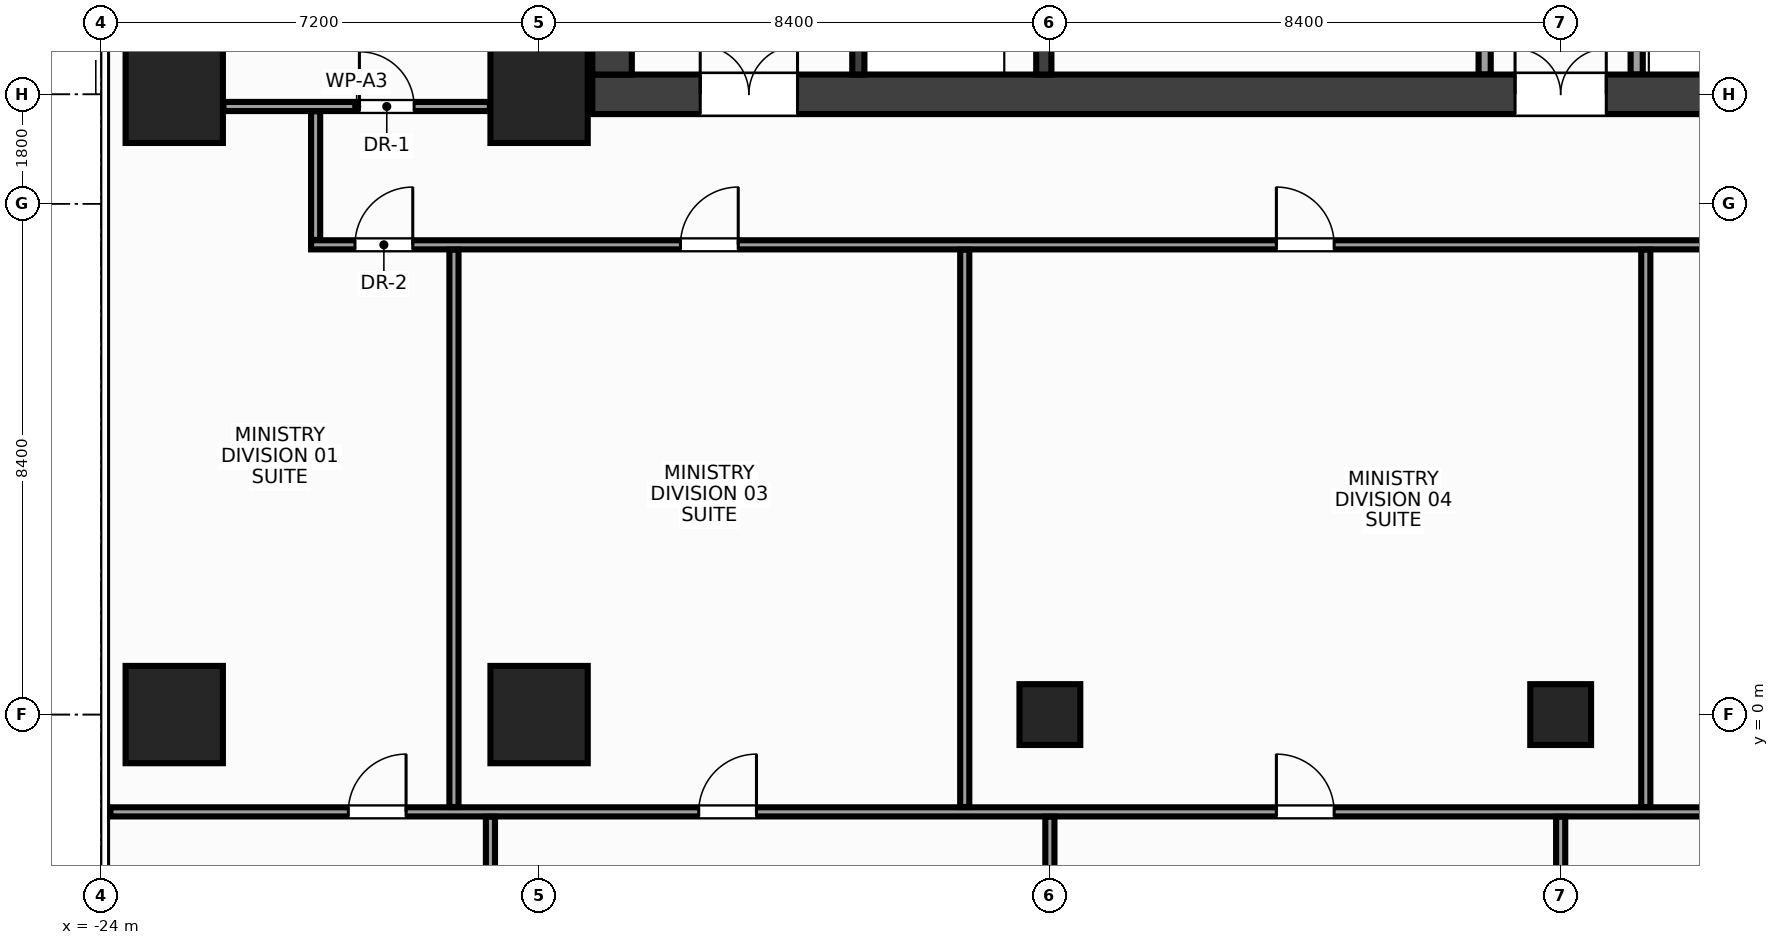
"""IFC4 building model, lengths in metres.
Left out: names, types, materials, properties, quantities, classifications, styles, units other than length and angle.
Written with IfcOpenShell. Run it as: python <this file> out.ifc"""

import sys

from ifc_helpers import new_model, si_unit, direction, frame, frame_2d, origin, origin_with_axes, origin_2d, place, context, subcontext, project, spatial, rectangle, hollow_rectangle, extrude, source, transform, mapped, element, fill, save


model = new_model("IFC4")
c1 = context("Model", 3, precision=1e-05, world=origin(), true_north=direction((0.0, 1.0)))
c2 = subcontext(c1, "Body", "Model", "MODEL_VIEW")
j1 = project(units=[si_unit("LENGTHUNIT", "METRE"), si_unit("PLANEANGLEUNIT", "RADIAN")], contexts=[c1])
p1 = place(None, origin())
s1 = spatial("IfcSite", under=j1, at=p1, CompositionType="ELEMENT")
p2 = place(p1, origin())
s2 = spatial("IfcBuilding", under=s1, at=p2, CompositionType="ELEMENT")
p3 = place(p2, frame((0.0, 0.0, 153.2)))
s3 = spatial("IfcBuildingStorey", under=s2, at=p3, CompositionType="ELEMENT", Elevation=153.2)
m1 = source(origin(), c2, "Body", "SweptSolid", [
    extrude(rectangle(XDim=31.85, YDim=0.65, at=frame_2d((15.925, 0.0))), origin(), (0.0, 0.0, 1.0), 3.6),
])
p4 = place(p3, frame((-15.925, 10.2, 0.0), z_axis=(0.0, 0.0, 1.0), x_axis=(1.0, 0.0, 0.0)))
e1 = element("IfcWall", 1, at=p4, inside=s3, PredefinedType="SHEAR", context=c2, shape_type="MappedRepresentation", body=[
    mapped(m1, transform((0.0, 0.0, 0.0), x_axis=(1.0, 0.0, 0.0), y_axis=(0.0, 1.0, 0.0), z_axis=(0.0, 0.0, 1.0), scale=1.0)),
])
p5 = place(p4, frame((1.775, 0.0, 0.0)))
e2 = element("IfcOpeningElement", 2, at=p5, cuts=e1, PredefinedType="OPENING", context=c2, shape_type="SweptSolid", body=[
    extrude(rectangle(XDim=1.6, YDim=2.15, at=frame_2d((0.8, 1.075))), frame((0.0, 0.337, 0.0), z_axis=(0.0, -1.0, 0.0), x_axis=(1.0, 0.0, 0.0)), (0.0, 0.0, 1.0), 0.674),
])
p6 = place(p4, frame((28.475, 0.0, 0.0)))
e3 = element("IfcOpeningElement", 3, at=p6, cuts=e1, PredefinedType="OPENING", context=c2, shape_type="SweptSolid", body=[
    extrude(rectangle(XDim=1.6, YDim=2.15, at=frame_2d((0.8, 1.075))), frame((0.0, 0.337, 0.0), z_axis=(0.0, -1.0, 0.0), x_axis=(1.0, 0.0, 0.0)), (0.0, 0.0, 1.0), 0.674),
])
p7 = place(p4, frame((15.175, 0.0, 0.0)))
e4 = element("IfcOpeningElement", 4, at=p7, cuts=e1, PredefinedType="OPENING", context=c2, shape_type="SweptSolid", body=[
    extrude(rectangle(XDim=1.5, YDim=2.2, at=frame_2d((0.75, 1.1))), frame((0.0, 0.337, 0.0), z_axis=(0.0, -1.0, 0.0), x_axis=(1.0, 0.0, 0.0)), (0.0, 0.0, 1.0), 0.674),
])
m2 = source(origin(), c2, "Body", "SweptSolid", [
    extrude(rectangle(XDim=12.95, YDim=0.65, at=frame_2d((6.475, 0.0))), origin(), (0.0, 0.0, 1.0), 3.6),
])
p8 = place(p3, frame((-15.6, 10.525, 0.0), z_axis=(0.0, 0.0, 1.0), x_axis=(0.0, 1.0, 0.0)))
e5 = element("IfcWall", 5, at=p8, inside=s3, PredefinedType="SHEAR", context=c2, shape_type="MappedRepresentation", body=[
    mapped(m2, transform((0.0, 0.0, 0.0), x_axis=(1.0, 0.0, 0.0), y_axis=(0.0, 1.0, 0.0), z_axis=(0.0, 0.0, 1.0), scale=1.0)),
])
m3 = source(origin(), c2, "Body", "SweptSolid", [
    extrude(rectangle(XDim=12.95, YDim=0.25, at=frame_2d((6.475, 0.0))), origin(), (0.0, 0.0, 1.0), 3.6),
])
p9 = place(p3, frame((-8.5, 10.525, 0.0), z_axis=(0.0, 0.0, 1.0), x_axis=(0.0, 1.0, 0.0)))
e6 = element("IfcWall", 6, at=p9, inside=s3, PredefinedType="SHEAR", context=c2, shape_type="MappedRepresentation", body=[
    mapped(m3, transform((0.0, 0.0, 0.0), x_axis=(1.0, 0.0, 0.0), y_axis=(0.0, 1.0, 0.0), z_axis=(0.0, 0.0, 1.0), scale=1.0)),
])
p10 = place(p9, frame((4.145, 0.0, 0.0)))
e7 = element("IfcOpeningElement", 7, at=p10, cuts=e6, PredefinedType="OPENING", context=c2, shape_type="SweptSolid", body=[
    extrude(rectangle(XDim=1.1, YDim=2.15, at=frame_2d((0.55, 1.075))), frame((0.0, 0.137, 0.0), z_axis=(0.0, -1.0, 0.0), x_axis=(1.0, 0.0, 0.0)), (0.0, 0.0, 1.0), 0.274),
])
p11 = place(p9, frame((6.065, 0.0, 0.0)))
e8 = element("IfcOpeningElement", 8, at=p11, cuts=e6, PredefinedType="OPENING", context=c2, shape_type="SweptSolid", body=[
    extrude(rectangle(XDim=1.1, YDim=2.15, at=frame_2d((0.55, 1.075))), frame((0.0, 0.137, 0.0), z_axis=(0.0, -1.0, 0.0), x_axis=(1.0, 0.0, 0.0)), (0.0, 0.0, 1.0), 0.274),
])
p12 = place(p9, frame((7.985, 0.0, 0.0)))
e9 = element("IfcOpeningElement", 9, at=p12, cuts=e6, PredefinedType="OPENING", context=c2, shape_type="SweptSolid", body=[
    extrude(rectangle(XDim=1.1, YDim=2.15, at=frame_2d((0.55, 1.075))), frame((0.0, 0.137, 0.0), z_axis=(0.0, -1.0, 0.0), x_axis=(1.0, 0.0, 0.0)), (0.0, 0.0, 1.0), 0.274),
])
m4 = source(origin(), c2, "Body", "SweptSolid", [
    extrude(rectangle(XDim=3.125, YDim=0.2, at=frame_2d((1.562, 0.0))), origin(), (0.0, 0.0, 1.0), 3.6),
])
p13 = place(p3, frame((-11.55, 10.525, 0.0), z_axis=(0.0, 0.0, 1.0), x_axis=(0.0, 1.0, 0.0)))
e10 = element("IfcWall", 10, at=p13, inside=s3, PredefinedType="SHEAR", context=c2, shape_type="MappedRepresentation", body=[
    mapped(m4, transform((0.0, 0.0, 0.0), x_axis=(1.0, 0.0, 0.0), y_axis=(0.0, 1.0, 0.0), z_axis=(0.0, 0.0, 1.0), scale=1.0)),
])
p14 = place(p13, frame((0.9, 0.0, 0.0)))
e11 = element("IfcOpeningElement", 11, at=p14, cuts=e10, PredefinedType="OPENING", context=c2, shape_type="SweptSolid", body=[
    extrude(rectangle(XDim=1.1, YDim=2.15, at=frame_2d((0.55, 1.075))), frame((0.0, 0.112, 0.0), z_axis=(0.0, -1.0, 0.0), x_axis=(1.0, 0.0, 0.0)), (0.0, 0.0, 1.0), 0.224),
])
m5 = source(origin(), c2, "Body", "SweptSolid", [
    extrude(rectangle(XDim=1.6, YDim=1.6, at=origin_2d()), origin(), (0.0, 0.0, 1.0), 3.6),
])
for number, where, z_axis, x_axis in (
    (12, (-16.8, 0.0, 0.0), (0.0, 0.0, 1.0), (1.0, 0.0, 0.0)),
    (13, (-16.8, 10.2, 0.0), (0.0, 0.0, 1.0), (1.0, 0.0, 0.0)),
    (14, (-22.8, 0.0, 0.0), (0.0, 0.0, 1.0), (1.0, 0.0, 0.0)),
    (15, (-22.8, 10.2, 0.0), (0.0, 0.0, 1.0), (1.0, 0.0, 0.0)),
):
    element("IfcColumn", number, at=place(p3, frame(where, z_axis=z_axis, x_axis=x_axis)), inside=s3, PredefinedType="COLUMN", context=c2, shape_type="MappedRepresentation", body=[
        mapped(m5, transform((0.0, 0.0, 0.0), x_axis=(1.0, 0.0, 0.0), y_axis=(0.0, 1.0, 0.0), z_axis=(0.0, 0.0, 1.0), scale=1.0)),
    ])
m6 = source(origin(), c2, "Body", "SweptSolid", [
    extrude(hollow_rectangle(XDim=1.0, YDim=1.0, WallThickness=0.045, at=origin_2d()), origin(), (0.0, 0.0, 1.0), 3.6),
])
p15 = place(p3, frame((-8.4, 0.0, 0.0), z_axis=(0.0, 0.0, 1.0), x_axis=(1.0, 0.0, 0.0)))
e16 = element("IfcColumn", 16, at=p15, inside=s3, PredefinedType="COLUMN", context=c2, shape_type="MappedRepresentation", body=[
    mapped(m6, transform((0.0, 0.0, 0.0), x_axis=(1.0, 0.0, 0.0), y_axis=(0.0, 1.0, 0.0), z_axis=(0.0, 0.0, 1.0), scale=1.0)),
])
m7 = source(origin(), c2, "Body", "SweptSolid", [
    extrude(rectangle(XDim=1.0, YDim=1.0, at=origin_2d()), origin(), (0.0, 0.0, 1.0), 3.6),
])
p16 = place(p3, origin_with_axes())
e17 = element("IfcColumn", 17, at=p16, inside=s3, PredefinedType="COLUMN", context=c2, shape_type="MappedRepresentation", body=[
    mapped(m7, transform((0.0, 0.0, 0.0), x_axis=(1.0, 0.0, 0.0), y_axis=(0.0, 1.0, 0.0), z_axis=(0.0, 0.0, 1.0), scale=1.0)),
])
m8 = source(origin(), c2, "Body", "SweptSolid", [
    extrude(rectangle(XDim=3.415, YDim=0.2, at=frame_2d((1.708, 0.0))), origin(), (0.0, 0.0, 1.0), 3.38),
])
for number, where, z_axis, x_axis in (
    (18, (-1.25, 10.525, 0.0), (0.0, 0.0, 1.0), (0.0, 1.0, 0.0)),
    (19, (1.25, 10.525, 0.0), (0.0, 0.0, 1.0), (0.0, 1.0, 0.0)),
):
    element("IfcWall", number, at=place(p3, frame(where, z_axis=z_axis, x_axis=x_axis)), inside=s3, PredefinedType="PARTITIONING", context=c2, shape_type="MappedRepresentation", body=[
        mapped(m8, transform((0.0, 0.0, 0.0), x_axis=(1.0, 0.0, 0.0), y_axis=(0.0, 1.0, 0.0), z_axis=(0.0, 0.0, 1.0), scale=1.0)),
    ])
m9 = source(origin(), c2, "Body", "SweptSolid", [
    extrude(rectangle(XDim=4.38, YDim=0.15, at=frame_2d((2.19, 0.0))), origin(), (0.0, 0.0, 1.0), 2.915),
])
p17 = place(p3, frame((-21.99, 10.0, 0.0), z_axis=(0.0, 0.0, 1.0), x_axis=(1.0, 0.0, 0.0)))
e20 = element("IfcWall", 20, at=p17, inside=s3, PredefinedType="PARTITIONING", context=c2, shape_type="MappedRepresentation", body=[
    mapped(m9, transform((0.0, 0.0, 0.0), x_axis=(1.0, 0.0, 0.0), y_axis=(0.0, 1.0, 0.0), z_axis=(0.0, 0.0, 1.0), scale=1.0)),
])
p18 = place(p17, frame((2.235, 0.0, 0.0)))
e21 = element("IfcOpeningElement", 21, at=p18, cuts=e20, PredefinedType="OPENING", context=c2, shape_type="SweptSolid", body=[
    extrude(rectangle(XDim=0.9, YDim=2.15, at=frame_2d((0.45, 1.075))), frame((0.0, 0.087, 0.0), z_axis=(0.0, -1.0, 0.0), x_axis=(1.0, 0.0, 0.0)), (0.0, 0.0, 1.0), 0.174),
])
m10 = source(origin(), c2, "Body", "SweptSolid", [
    extrude(rectangle(XDim=31.6, YDim=0.15, at=frame_2d((15.8, 0.0))), origin(), (0.0, 0.0, 1.0), 2.765),
])
p19 = place(p3, frame((-20.55, 7.725, 0.0), z_axis=(0.0, 0.0, 1.0), x_axis=(1.0, 0.0, 0.0)))
e22 = element("IfcWall", 22, at=p19, inside=s3, PredefinedType="PARTITIONING", context=c2, shape_type="MappedRepresentation", body=[
    mapped(m10, transform((0.0, 0.0, 0.0), x_axis=(1.0, 0.0, 0.0), y_axis=(0.0, 1.0, 0.0), z_axis=(0.0, 0.0, 1.0), scale=1.0)),
])
p20 = place(p19, frame((0.722, 0.0, 0.0)))
e23 = element("IfcOpeningElement", 23, at=p20, cuts=e22, PredefinedType="OPENING", context=c2, shape_type="SweptSolid", body=[
    extrude(rectangle(XDim=0.95, YDim=2.15, at=frame_2d((0.475, 1.075))), frame((0.0, 0.087, 0.0), z_axis=(0.0, -1.0, 0.0), x_axis=(1.0, 0.0, 0.0)), (0.0, 0.0, 1.0), 0.174),
])
p21 = place(p19, frame((6.075, 0.0, 0.0)))
e24 = element("IfcOpeningElement", 24, at=p21, cuts=e22, PredefinedType="OPENING", context=c2, shape_type="SweptSolid", body=[
    extrude(rectangle(XDim=0.95, YDim=2.15, at=frame_2d((0.475, 1.075))), frame((0.0, 0.087, 0.0), z_axis=(0.0, -1.0, 0.0), x_axis=(1.0, 0.0, 0.0)), (0.0, 0.0, 1.0), 0.174),
])
p22 = place(p19, frame((15.875, 0.0, 0.0)))
e25 = element("IfcOpeningElement", 25, at=p22, cuts=e22, PredefinedType="OPENING", context=c2, shape_type="SweptSolid", body=[
    extrude(rectangle(XDim=0.95, YDim=2.15, at=frame_2d((0.475, 1.075))), frame((0.0, 0.087, 0.0), z_axis=(0.0, -1.0, 0.0), x_axis=(1.0, 0.0, 0.0)), (0.0, 0.0, 1.0), 0.174),
])
p23 = place(p19, frame((26.278, 0.0, 0.0)))
e26 = element("IfcOpeningElement", 26, at=p23, cuts=e22, PredefinedType="OPENING", context=c2, shape_type="SweptSolid", body=[
    extrude(rectangle(XDim=0.95, YDim=2.15, at=frame_2d((0.475, 1.075))), frame((0.0, 0.087, 0.0), z_axis=(0.0, -1.0, 0.0), x_axis=(1.0, 0.0, 0.0)), (0.0, 0.0, 1.0), 0.174),
])
m11 = source(origin(), c2, "Body", "SweptSolid", [
    extrude(rectangle(XDim=2.115, YDim=0.15, at=frame_2d((1.058, 0.0))), origin(), (0.0, 0.0, 1.0), 3.38),
])
p24 = place(p3, frame((-20.475, 7.805, 0.0), z_axis=(0.0, 0.0, 1.0), x_axis=(0.0, 1.0, 0.0)))
e27 = element("IfcWall", 27, at=p24, inside=s3, PredefinedType="PARTITIONING", context=c2, shape_type="MappedRepresentation", body=[
    mapped(m11, transform((0.0, 0.0, 0.0), x_axis=(1.0, 0.0, 0.0), y_axis=(0.0, 1.0, 0.0), z_axis=(0.0, 0.0, 1.0), scale=1.0)),
])
m12 = source(origin(), c2, "Body", "SweptSolid", [
    extrude(rectangle(XDim=34.895, YDim=0.15, at=frame_2d((17.448, 0.0))), origin(), (0.0, 0.0, 1.0), 2.765),
])
p25 = place(p3, frame((-23.85, -1.6, 0.0), z_axis=(0.0, 0.0, 1.0), x_axis=(1.0, 0.0, 0.0)))
e28 = element("IfcWall", 28, at=p25, inside=s3, PredefinedType="PARTITIONING", context=c2, shape_type="MappedRepresentation", body=[
    mapped(m12, transform((0.0, 0.0, 0.0), x_axis=(1.0, 0.0, 0.0), y_axis=(0.0, 1.0, 0.0), z_axis=(0.0, 0.0, 1.0), scale=1.0)),
])
p26 = place(p25, frame((3.913, 0.0, 0.0)))
e29 = element("IfcOpeningElement", 29, at=p26, cuts=e28, PredefinedType="OPENING", context=c2, shape_type="SweptSolid", body=[
    extrude(rectangle(XDim=0.95, YDim=2.15, at=frame_2d((0.475, 1.075))), frame((0.0, 0.087, 0.0), z_axis=(0.0, -1.0, 0.0), x_axis=(1.0, 0.0, 0.0)), (0.0, 0.0, 1.0), 0.174),
])
p27 = place(p25, frame((9.675, 0.0, 0.0)))
e30 = element("IfcOpeningElement", 30, at=p27, cuts=e28, PredefinedType="OPENING", context=c2, shape_type="SweptSolid", body=[
    extrude(rectangle(XDim=0.95, YDim=2.15, at=frame_2d((0.475, 1.075))), frame((0.0, 0.087, 0.0), z_axis=(0.0, -1.0, 0.0), x_axis=(1.0, 0.0, 0.0)), (0.0, 0.0, 1.0), 0.174),
])
p28 = place(p25, frame((19.175, 0.0, 0.0)))
e31 = element("IfcOpeningElement", 31, at=p28, cuts=e28, PredefinedType="OPENING", context=c2, shape_type="SweptSolid", body=[
    extrude(rectangle(XDim=0.95, YDim=2.15, at=frame_2d((0.475, 1.075))), frame((0.0, 0.087, 0.0), z_axis=(0.0, -1.0, 0.0), x_axis=(1.0, 0.0, 0.0)), (0.0, 0.0, 1.0), 0.174),
])
p29 = place(p25, frame((28.275, 0.0, 0.0)))
e32 = element("IfcOpeningElement", 32, at=p29, cuts=e28, PredefinedType="OPENING", context=c2, shape_type="SweptSolid", body=[
    extrude(rectangle(XDim=0.95, YDim=2.15, at=frame_2d((0.475, 1.075))), frame((0.0, 0.087, 0.0), z_axis=(0.0, -1.0, 0.0), x_axis=(1.0, 0.0, 0.0)), (0.0, 0.0, 1.0), 0.174),
])
m13 = source(origin(), c2, "Body", "SweptSolid", [
    extrude(rectangle(XDim=9.165, YDim=0.15, at=frame_2d((4.583, 0.0))), origin(), (0.0, 0.0, 1.0), 2.915),
])
p30 = place(p3, frame((-18.2, -1.52, 0.0), z_axis=(0.0, 0.0, 1.0), x_axis=(0.0, 1.0, 0.0)))
e33 = element("IfcWall", 33, at=p30, inside=s3, PredefinedType="PARTITIONING", context=c2, shape_type="MappedRepresentation", body=[
    mapped(m13, transform((0.0, 0.0, 0.0), x_axis=(1.0, 0.0, 0.0), y_axis=(0.0, 1.0, 0.0), z_axis=(0.0, 0.0, 1.0), scale=1.0)),
])
m14 = source(origin(), c2, "Body", "SweptSolid", [
    extrude(rectangle(XDim=9.165, YDim=0.15, at=frame_2d((4.583, 0.0))), origin(), (0.0, 0.0, 1.0), 2.665),
])
for number, where, z_axis, x_axis in (
    (34, (-9.8, -1.52, 0.0), (0.0, 0.0, 1.0), (0.0, 1.0, 0.0)),
    (35, (1.4, -1.52, 0.0), (0.0, 0.0, 1.0), (0.0, 1.0, 0.0)),
):
    element("IfcWall", number, at=place(p3, frame(where, z_axis=z_axis, x_axis=x_axis)), inside=s3, PredefinedType="PARTITIONING", context=c2, shape_type="MappedRepresentation", body=[
        mapped(m14, transform((0.0, 0.0, 0.0), x_axis=(1.0, 0.0, 0.0), y_axis=(0.0, 1.0, 0.0), z_axis=(0.0, 0.0, 1.0), scale=1.0)),
    ])
m15 = source(origin(), c2, "Body", "SweptSolid", [
    extrude(rectangle(XDim=8.31, YDim=0.15, at=frame_2d((4.155, 0.0))), origin(), (0.0, 0.0, 1.0), 3.38),
])
p31 = place(p3, frame((-17.6, -9.99, 0.0), z_axis=(0.0, 0.0, 1.0), x_axis=(0.0, 1.0, 0.0)))
e36 = element("IfcWall", 36, at=p31, inside=s3, PredefinedType="PARTITIONING", context=c2, shape_type="MappedRepresentation", body=[
    mapped(m15, transform((0.0, 0.0, 0.0), x_axis=(1.0, 0.0, 0.0), y_axis=(0.0, 1.0, 0.0), z_axis=(0.0, 0.0, 1.0), scale=1.0)),
])
m16 = source(origin(), c2, "Body", "SweptSolid", [
    extrude(rectangle(XDim=8.61, YDim=0.15, at=frame_2d((4.305, 0.0))), origin(), (0.0, 0.0, 1.0), 2.765),
])
for number, where, z_axis, x_axis in (
    (37, (-8.4, -10.29, 0.0), (0.0, 0.0, 1.0), (0.0, 1.0, 0.0)),
    (38, (0.0, -10.29, 0.0), (0.0, 0.0, 1.0), (0.0, 1.0, 0.0)),
):
    element("IfcWall", number, at=place(p3, frame(where, z_axis=z_axis, x_axis=x_axis)), inside=s3, PredefinedType="PARTITIONING", context=c2, shape_type="MappedRepresentation", body=[
        mapped(m16, transform((0.0, 0.0, 0.0), x_axis=(1.0, 0.0, 0.0), y_axis=(0.0, 1.0, 0.0), z_axis=(0.0, 0.0, 1.0), scale=1.0)),
    ])
m17 = source(origin(), c2, "Body", "SweptSolid", [
    extrude(rectangle(XDim=1.6, YDim=2.15, at=frame_2d((0.8, 1.075))), frame((0.0, 0.025, 0.0), z_axis=(0.0, -1.0, 0.0), x_axis=(1.0, 0.0, 0.0)), (0.0, 0.0, 1.0), 0.05),
])
p32 = place(p5, origin())
e39 = element("IfcDoor", 39, at=p32, inside=s3, OperationType="DOUBLE_DOOR_SINGLE_SWING", PredefinedType="DOOR", context=c2, shape_type="MappedRepresentation", body=[
    mapped(m17, transform((0.0, 0.0, 0.0), x_axis=(1.0, 0.0, 0.0), y_axis=(0.0, 1.0, 0.0), z_axis=(0.0, 0.0, 1.0), scale=1.0)),
])
fill(e2, e39)
m18 = source(origin(), c2, "Body", "SweptSolid", [
    extrude(rectangle(XDim=1.5, YDim=2.2, at=frame_2d((0.75, 1.1))), frame((0.0, 0.025, 0.0), z_axis=(0.0, -1.0, 0.0), x_axis=(1.0, 0.0, 0.0)), (0.0, 0.0, 1.0), 0.05),
])
p33 = place(p7, origin())
e40 = element("IfcDoor", 40, at=p33, inside=s3, OperationType="DOUBLE_DOOR_SINGLE_SWING", PredefinedType="DOOR", context=c2, shape_type="MappedRepresentation", body=[
    mapped(m18, transform((0.0, 0.0, 0.0), x_axis=(1.0, 0.0, 0.0), y_axis=(0.0, 1.0, 0.0), z_axis=(0.0, 0.0, 1.0), scale=1.0)),
])
fill(e4, e40)
m19 = source(origin(), c2, "Body", "SweptSolid", [
    extrude(rectangle(XDim=0.9, YDim=2.15, at=frame_2d((0.45, 1.075))), frame((0.0, 0.025, 0.0), z_axis=(0.0, -1.0, 0.0), x_axis=(1.0, 0.0, 0.0)), (0.0, 0.0, 1.0), 0.05),
])
p34 = place(p18, origin())
e41 = element("IfcDoor", 41, at=p34, inside=s3, OperationType="SINGLE_SWING_LEFT", PredefinedType="DOOR", context=c2, shape_type="MappedRepresentation", body=[
    mapped(m19, transform((0.0, 0.0, 0.0), x_axis=(1.0, 0.0, 0.0), y_axis=(0.0, 1.0, 0.0), z_axis=(0.0, 0.0, 1.0), scale=1.0)),
])
fill(e21, e41)
m20 = source(origin(), c2, "Body", "SweptSolid", [
    extrude(rectangle(XDim=0.95, YDim=2.15, at=frame_2d((0.475, 1.075))), frame((0.0, 0.025, 0.0), z_axis=(0.0, -1.0, 0.0), x_axis=(1.0, 0.0, 0.0)), (0.0, 0.0, 1.0), 0.05),
])
p35 = place(p20, origin())
e42 = element("IfcDoor", 42, at=p35, inside=s3, OperationType="SINGLE_SWING_RIGHT", PredefinedType="DOOR", context=c2, shape_type="MappedRepresentation", body=[
    mapped(m20, transform((0.0, 0.0, 0.0), x_axis=(1.0, 0.0, 0.0), y_axis=(0.0, 1.0, 0.0), z_axis=(0.0, 0.0, 1.0), scale=1.0)),
])
fill(e23, e42)
p36 = place(p21, origin())
e43 = element("IfcDoor", 43, at=p36, inside=s3, OperationType="SINGLE_SWING_RIGHT", PredefinedType="DOOR", context=c2, shape_type="MappedRepresentation", body=[
    mapped(m20, transform((0.0, 0.0, 0.0), x_axis=(1.0, 0.0, 0.0), y_axis=(0.0, 1.0, 0.0), z_axis=(0.0, 0.0, 1.0), scale=1.0)),
])
fill(e24, e43)
p37 = place(p22, origin())
e44 = element("IfcDoor", 44, at=p37, inside=s3, OperationType="SINGLE_SWING_LEFT", PredefinedType="DOOR", context=c2, shape_type="MappedRepresentation", body=[
    mapped(m20, transform((0.0, 0.0, 0.0), x_axis=(1.0, 0.0, 0.0), y_axis=(0.0, 1.0, 0.0), z_axis=(0.0, 0.0, 1.0), scale=1.0)),
])
fill(e25, e44)
p38 = place(p26, origin())
e45 = element("IfcDoor", 45, at=p38, inside=s3, OperationType="SINGLE_SWING_RIGHT", PredefinedType="DOOR", context=c2, shape_type="MappedRepresentation", body=[
    mapped(m20, transform((0.0, 0.0, 0.0), x_axis=(1.0, 0.0, 0.0), y_axis=(0.0, 1.0, 0.0), z_axis=(0.0, 0.0, 1.0), scale=1.0)),
])
fill(e29, e45)
p39 = place(p27, origin())
e46 = element("IfcDoor", 46, at=p39, inside=s3, OperationType="SINGLE_SWING_RIGHT", PredefinedType="DOOR", context=c2, shape_type="MappedRepresentation", body=[
    mapped(m20, transform((0.0, 0.0, 0.0), x_axis=(1.0, 0.0, 0.0), y_axis=(0.0, 1.0, 0.0), z_axis=(0.0, 0.0, 1.0), scale=1.0)),
])
fill(e30, e46)
p40 = place(p28, origin())
e47 = element("IfcDoor", 47, at=p40, inside=s3, OperationType="SINGLE_SWING_LEFT", PredefinedType="DOOR", context=c2, shape_type="MappedRepresentation", body=[
    mapped(m20, transform((0.0, 0.0, 0.0), x_axis=(1.0, 0.0, 0.0), y_axis=(0.0, 1.0, 0.0), z_axis=(0.0, 0.0, 1.0), scale=1.0)),
])
fill(e31, e47)
save(model, sys.argv[1])
